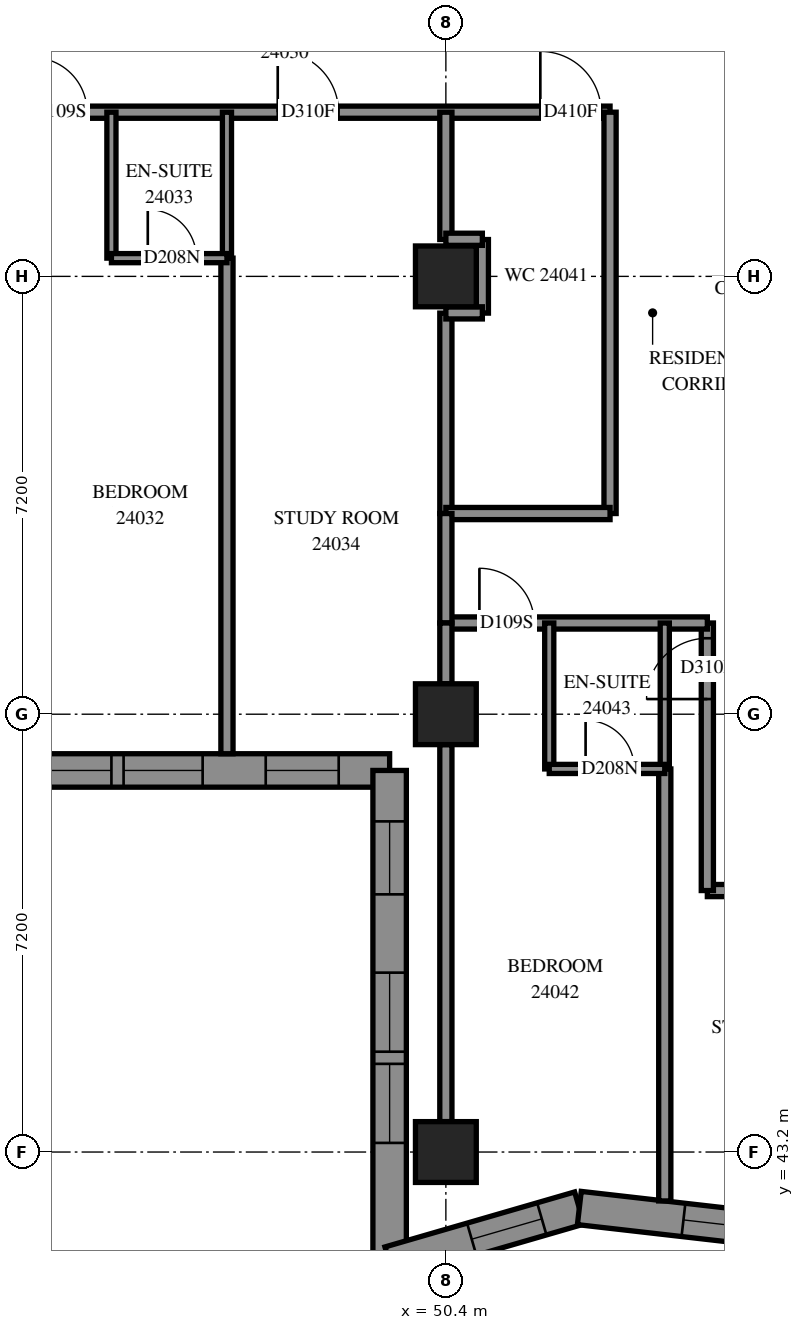
"""IFC4 building model, lengths in metres.
Left out: names, types, materials, properties, quantities, classifications, styles, units other than length and angle.
Written with IfcOpenShell. Run it as: python <this file> out.ifc"""

import sys

from ifc_helpers import new_model, si_unit, direction, frame, frame_2d, origin, origin_2d, place, context, subcontext, project, spatial, polyline, rectangle, outline, extrude, element, fill, save


model = new_model("IFC4")
c1 = context("Model", 3, precision=1e-05, world=origin(), true_north=direction((0.0, 1.0)))
c2 = subcontext(c1, "Body", "Model", "MODEL_VIEW")
j1 = project(units=[si_unit("LENGTHUNIT", "METRE"), si_unit("PLANEANGLEUNIT", "RADIAN")], contexts=[c1])
p1 = place(None, origin())
s1 = spatial("IfcSite", under=j1, at=p1, CompositionType="ELEMENT")
p2 = place(p1, origin())
s2 = spatial("IfcBuilding", under=s1, at=p2, CompositionType="ELEMENT")
p3 = place(p2, frame((0.0, 0.0, 91.4)))
s3 = spatial("IfcBuildingStorey", under=s2, at=p3, CompositionType="ELEMENT", Elevation=91.4)
for number, where, z_axis, x_axis in (
    (1, (50.4, 43.2, 0.0), (0.0, 0.0, 1.0), (1.0, 0.0, 0.0)),
    (2, (50.4, 50.4, 0.0), (0.0, 0.0, 1.0), (1.0, 0.0, 0.0)),
    (3, (50.4, 57.6, 0.0), (0.0, 0.0, 1.0), (1.0, 0.0, 0.0)),
):
    element("IfcColumn", number, at=place(p3, frame(where, z_axis=z_axis, x_axis=x_axis)), inside=s3, PredefinedType="COLUMN", context=c2, shape_type="SweptSolid", body=[
        extrude(rectangle(XDim=1.0, YDim=1.0, at=origin_2d()), origin(), (0.0, 0.0, 1.0), 3.1),
    ])
p4 = place(p3, frame((42.275, 49.475, 0.0), z_axis=(0.0, 0.0, 1.0), x_axis=(1.0, 0.0, 0.0)))
e4 = element("IfcWall", 4, at=p4, inside=s3, PredefinedType="SOLIDWALL", context=c2, shape_type="SweptSolid", body=[
    extrude(outline(polyline([(-0.275, -0.275), (6.925, -0.275), (7.475, 0.275), (0.275, 0.275), (-0.275, -0.275)])), origin(), (0.0, 0.0, 1.0), 3.1),
])
p5 = place(p4, frame((1.325, 0.0, 0.5)))
e5 = element("IfcOpeningElement", 5, at=p5, cuts=e4, PredefinedType="OPENING", context=c2, shape_type="SweptSolid", body=[
    extrude(rectangle(XDim=1.3, YDim=2.45, at=frame_2d((0.65, 1.225))), frame((0.0, 0.285, 0.0), z_axis=(0.0, -1.0, 0.0), x_axis=(1.0, 0.0, 0.0)), (0.0, 0.0, 1.0), 0.57),
])
p6 = place(p4, frame((2.825, 0.0, 0.5)))
e6 = element("IfcOpeningElement", 6, at=p6, cuts=e4, PredefinedType="OPENING", context=c2, shape_type="SweptSolid", body=[
    extrude(rectangle(XDim=1.3, YDim=2.45, at=frame_2d((0.65, 1.225))), frame((0.0, 0.285, 0.0), z_axis=(0.0, -1.0, 0.0), x_axis=(1.0, 0.0, 0.0)), (0.0, 0.0, 1.0), 0.57),
])
p7 = place(p4, frame((5.162, 0.0, 0.5)))
e7 = element("IfcOpeningElement", 7, at=p7, cuts=e4, PredefinedType="OPENING", context=c2, shape_type="SweptSolid", body=[
    extrude(rectangle(XDim=1.2, YDim=2.45, at=frame_2d((0.6, 1.225))), frame((0.0, 0.285, 0.0), z_axis=(0.0, -1.0, 0.0), x_axis=(1.0, 0.0, 0.0)), (0.0, 0.0, 1.0), 0.57),
])
p8 = place(p3, frame((49.475, 49.475, 0.0), z_axis=(0.0, 0.0, 1.0), x_axis=(0.0, -1.0, 0.0)))
e8 = element("IfcWall", 8, at=p8, inside=s3, PredefinedType="SOLIDWALL", context=c2, shape_type="SweptSolid", body=[
    extrude(outline(polyline([(0.275, -0.275), (8.466, -0.275), (7.734, 0.275), (-0.275, 0.275), (0.275, -0.275)])), origin(), (0.0, 0.0, 1.0), 3.1),
])
p9 = place(p8, frame((3.325, 0.0, 0.5)))
e9 = element("IfcOpeningElement", 9, at=p9, cuts=e8, PredefinedType="OPENING", context=c2, shape_type="SweptSolid", body=[
    extrude(rectangle(XDim=1.3, YDim=2.45, at=frame_2d((0.65, 1.225))), frame((0.0, 0.285, 0.0), z_axis=(0.0, -1.0, 0.0), x_axis=(1.0, 0.0, 0.0)), (0.0, 0.0, 1.0), 0.57),
])
p10 = place(p8, frame((4.825, 0.0, 0.5)))
e10 = element("IfcOpeningElement", 10, at=p10, cuts=e8, PredefinedType="OPENING", context=c2, shape_type="SweptSolid", body=[
    extrude(rectangle(XDim=1.3, YDim=2.45, at=frame_2d((0.65, 1.225))), frame((0.0, 0.285, 0.0), z_axis=(0.0, -1.0, 0.0), x_axis=(1.0, 0.0, 0.0)), (0.0, 0.0, 1.0), 0.57),
])
p11 = place(p8, frame((0.838, 0.0, 0.5)))
e11 = element("IfcOpeningElement", 11, at=p11, cuts=e8, PredefinedType="OPENING", context=c2, shape_type="SweptSolid", body=[
    extrude(rectangle(XDim=1.2, YDim=2.45, at=frame_2d((0.6, 1.225))), frame((0.0, 0.285, 0.0), z_axis=(0.0, -1.0, 0.0), x_axis=(1.0, 0.0, 0.0)), (0.0, 0.0, 1.0), 0.57),
])
p12 = place(p3, frame((49.475, 41.375, 0.0), z_axis=(0.0, 0.0, 1.0), x_axis=(0.9604525251, 0.2784437952, 0.0)))
e12 = element("IfcWall", 12, at=p12, inside=s3, PredefinedType="SOLIDWALL", context=c2, shape_type="SweptSolid", body=[
    extrude(outline(polyline([(-0.366, -0.275), (3.193, -0.275), (3.303, 0.275), (0.366, 0.275), (-0.366, -0.275)])), origin(), (0.0, 0.0, 1.0), 3.1),
])
p13 = place(p12, frame((1.406, 0.0, 0.5)))
e13 = element("IfcOpeningElement", 13, at=p13, cuts=e12, PredefinedType="OPENING", context=c2, shape_type="SweptSolid", body=[
    extrude(rectangle(XDim=1.2, YDim=2.45, at=frame_2d((0.6, 1.225))), frame((0.0, 0.285, 0.0), z_axis=(0.0, -1.0, 0.0), x_axis=(1.0, 0.0, 0.0)), (0.0, 0.0, 1.0), 0.57),
])
p14 = place(p3, frame((52.595, 42.279, 0.0), z_axis=(0.0, 0.0, 1.0), x_axis=(0.9935212234, -0.1136467272, 0.0)))
e14 = element("IfcWall", 14, at=p14, inside=s3, PredefinedType="SOLIDWALL", context=c2, shape_type="SweptSolid", body=[
    extrude(outline(polyline([(0.055, -0.275), (3.496, -0.275), (3.433, 0.275), (-0.055, 0.275), (0.055, -0.275)])), origin(), (0.0, 0.0, 1.0), 3.1),
])
p15 = place(p14, frame((1.724, 0.0, 0.5)))
e15 = element("IfcOpeningElement", 15, at=p15, cuts=e14, PredefinedType="OPENING", context=c2, shape_type="SweptSolid", body=[
    extrude(rectangle(XDim=1.2, YDim=2.45, at=frame_2d((0.6, 1.225))), frame((0.0, 0.285, 0.0), z_axis=(0.0, -1.0, 0.0), x_axis=(1.0, 0.0, 0.0)), (0.0, 0.0, 1.0), 0.57),
])
p16 = place(p3, frame((28.802, 60.3, 0.0), z_axis=(0.0, 0.0, 1.0), x_axis=(1.0, 0.0, 0.0)))
e16 = element("IfcWall", 16, at=p16, inside=s3, PredefinedType="PARTITIONING", context=c2, shape_type="SweptSolid", body=[
    extrude(rectangle(XDim=24.298, YDim=0.2, at=frame_2d((12.149, 0.0))), origin(), (0.0, 0.0, 1.0), 3.1),
])
p17 = place(p16, frame((5.972, 0.0, 0.0)))
e17 = element("IfcOpeningElement", 17, at=p17, cuts=e16, PredefinedType="OPENING", context=c2, shape_type="SweptSolid", body=[
    extrude(rectangle(XDim=1.0, YDim=2.1, at=frame_2d((0.5, 1.05))), frame((0.0, 0.11, 0.0), z_axis=(0.0, -1.0, 0.0), x_axis=(1.0, 0.0, 0.0)), (0.0, 0.0, 1.0), 0.22),
])
p18 = place(p16, frame((11.323, 0.0, 0.0)))
e18 = element("IfcOpeningElement", 18, at=p18, cuts=e16, PredefinedType="OPENING", context=c2, shape_type="SweptSolid", body=[
    extrude(rectangle(XDim=1.0, YDim=2.1, at=frame_2d((0.5, 1.05))), frame((0.0, 0.11, 0.0), z_axis=(0.0, -1.0, 0.0), x_axis=(1.0, 0.0, 0.0)), (0.0, 0.0, 1.0), 0.22),
])
p19 = place(p16, frame((14.798, 0.0, 0.0)))
e19 = element("IfcOpeningElement", 19, at=p19, cuts=e16, PredefinedType="OPENING", context=c2, shape_type="SweptSolid", body=[
    extrude(rectangle(XDim=0.9, YDim=2.1, at=frame_2d((0.45, 1.05))), frame((0.0, 0.11, 0.0), z_axis=(0.0, -1.0, 0.0), x_axis=(1.0, 0.0, 0.0)), (0.0, 0.0, 1.0), 0.22),
])
p20 = place(p16, frame((18.833, 0.0, 0.0)))
e20 = element("IfcOpeningElement", 20, at=p20, cuts=e16, PredefinedType="OPENING", context=c2, shape_type="SweptSolid", body=[
    extrude(rectangle(XDim=1.0, YDim=2.1, at=frame_2d((0.5, 1.05))), frame((0.0, 0.11, 0.0), z_axis=(0.0, -1.0, 0.0), x_axis=(1.0, 0.0, 0.0)), (0.0, 0.0, 1.0), 0.22),
])
p21 = place(p16, frame((23.151, 0.0, 0.0)))
e21 = element("IfcOpeningElement", 21, at=p21, cuts=e16, PredefinedType="OPENING", context=c2, shape_type="SweptSolid", body=[
    extrude(rectangle(XDim=1.0, YDim=2.1, at=frame_2d((0.5, 1.05))), frame((0.0, 0.11, 0.0), z_axis=(0.0, -1.0, 0.0), x_axis=(1.0, 0.0, 0.0)), (0.0, 0.0, 1.0), 0.22),
])
p22 = place(p3, frame((54.7, 47.5, 0.0), z_axis=(0.0, 0.0, 1.0), x_axis=(1.0, 0.0, 0.0)))
e22 = element("IfcWall", 22, at=p22, inside=s3, PredefinedType="PARTITIONING", context=c2, shape_type="SweptSolid", body=[
    extrude(rectangle(XDim=19.442, YDim=0.2, at=frame_2d((9.721, 0.0))), origin(), (0.0, 0.0, 1.0), 3.1),
])
p23 = place(p22, frame((5.2, 0.0, 0.0)))
e23 = element("IfcOpeningElement", 23, at=p23, cuts=e22, PredefinedType="OPENING", context=c2, shape_type="SweptSolid", body=[
    extrude(rectangle(XDim=0.9, YDim=2.1, at=frame_2d((0.45, 1.05))), frame((0.0, 0.11, 0.0), z_axis=(0.0, -1.0, 0.0), x_axis=(1.0, 0.0, 0.0)), (0.0, 0.0, 1.0), 0.22),
])
p24 = place(p22, frame((6.9, 0.0, 0.0)))
e24 = element("IfcOpeningElement", 24, at=p24, cuts=e22, PredefinedType="OPENING", context=c2, shape_type="SweptSolid", body=[
    extrude(rectangle(XDim=0.9, YDim=2.1, at=frame_2d((0.45, 1.05))), frame((0.0, 0.11, 0.0), z_axis=(0.0, -1.0, 0.0), x_axis=(1.0, 0.0, 0.0)), (0.0, 0.0, 1.0), 0.22),
])
p25 = place(p22, frame((13.963, 0.0, 0.0)))
e25 = element("IfcOpeningElement", 25, at=p25, cuts=e22, PredefinedType="OPENING", context=c2, shape_type="SweptSolid", body=[
    extrude(rectangle(XDim=1.0, YDim=2.1, at=frame_2d((0.5, 1.05))), frame((0.0, 0.11, 0.0), z_axis=(0.0, -1.0, 0.0), x_axis=(1.0, 0.0, 0.0)), (0.0, 0.0, 1.0), 0.22),
])
p26 = place(p3, frame((46.8, 49.75, 0.0), z_axis=(0.0, 0.0, 1.0), x_axis=(0.0, 1.0, 0.0)))
e26 = element("IfcWall", 26, at=p26, inside=s3, PredefinedType="PARTITIONING", context=c2, shape_type="SweptSolid", body=[
    extrude(rectangle(XDim=8.15, YDim=0.2, at=frame_2d((4.075, 0.0))), origin(), (0.0, 0.0, 1.0), 3.1),
])
p27 = place(p3, frame((54.0, 42.395, 0.0), z_axis=(0.0, 0.0, 1.0), x_axis=(0.0, 1.0, 0.0)))
e27 = element("IfcWall", 27, at=p27, inside=s3, PredefinedType="PARTITIONING", context=c2, shape_type="SweptSolid", body=[
    extrude(rectangle(XDim=7.104, YDim=0.2, at=frame_2d((3.552, 0.0))), origin(), (0.0, 0.0, 1.0), 3.1),
])
p28 = place(p3, frame((53.1, 53.7, 0.0), z_axis=(0.0, 0.0, 1.0), x_axis=(0.0, 1.0, 0.0)))
e28 = element("IfcWall", 28, at=p28, inside=s3, PredefinedType="PARTITIONING", context=c2, shape_type="SweptSolid", body=[
    extrude(rectangle(XDim=6.6, YDim=0.2, at=frame_2d((3.3, 0.0))), origin(), (0.0, 0.0, 1.0), 3.1),
])
p29 = place(p3, frame((50.4, 43.7, 0.0), z_axis=(0.0, 0.0, 1.0), x_axis=(0.0, 1.0, 0.0)))
e29 = element("IfcWall", 29, at=p29, inside=s3, PredefinedType="PARTITIONING", context=c2, shape_type="SweptSolid", body=[
    extrude(rectangle(XDim=6.2, YDim=0.2, at=frame_2d((3.1, 0.0))), origin(), (0.0, 0.0, 1.0), 2.6),
])
p30 = place(p3, frame((54.7, 47.5, 0.0), z_axis=(0.0, 0.0, 1.0), x_axis=(0.0, 1.0, 0.0)))
e30 = element("IfcWall", 30, at=p30, inside=s3, PredefinedType="PARTITIONING", context=c2, shape_type="SweptSolid", body=[
    extrude(rectangle(XDim=4.4, YDim=0.2, at=frame_2d((2.2, 0.0))), origin(), (0.0, 0.0, 1.0), 3.1),
])
p31 = place(p30, frame((3.149, 0.0, 0.0)))
e31 = element("IfcOpeningElement", 31, at=p31, cuts=e30, PredefinedType="OPENING", context=c2, shape_type="SweptSolid", body=[
    extrude(rectangle(XDim=1.0, YDim=2.1, at=frame_2d((0.5, 1.05))), frame((0.0, 0.11, 0.0), z_axis=(0.0, -1.0, 0.0), x_axis=(1.0, 0.0, 0.0)), (0.0, 0.0, 1.0), 0.22),
])
p32 = place(p3, frame((50.4, 51.9, 0.0), z_axis=(0.0, 0.0, 1.0), x_axis=(1.0, 0.0, 0.0)))
e32 = element("IfcWall", 32, at=p32, inside=s3, PredefinedType="PARTITIONING", context=c2, shape_type="SweptSolid", body=[
    extrude(rectangle(XDim=4.3, YDim=0.2, at=frame_2d((2.15, 0.0))), origin(), (0.0, 0.0, 1.0), 3.1),
])
p33 = place(p32, frame((0.552, 0.0, 0.0)))
e33 = element("IfcOpeningElement", 33, at=p33, cuts=e32, PredefinedType="OPENING", context=c2, shape_type="SweptSolid", body=[
    extrude(rectangle(XDim=0.9, YDim=2.1, at=frame_2d((0.45, 1.05))), frame((0.0, 0.11, 0.0), z_axis=(0.0, -1.0, 0.0), x_axis=(1.0, 0.0, 0.0)), (0.0, 0.0, 1.0), 0.22),
])
p34 = place(p3, frame((50.4, 53.7, 0.0), z_axis=(0.0, 0.0, 1.0), x_axis=(0.0, 1.0, 0.0)))
e34 = element("IfcWall", 34, at=p34, inside=s3, PredefinedType="PARTITIONING", context=c2, shape_type="SweptSolid", body=[
    extrude(rectangle(XDim=3.296, YDim=0.2, at=frame_2d((1.648, 0.0))), origin(), (0.0, 0.0, 1.0), 3.1),
])
p35 = place(p3, frame((50.4, 53.7, 0.0), z_axis=(0.0, 0.0, 1.0), x_axis=(1.0, 0.0, 0.0)))
e35 = element("IfcWall", 35, at=p35, inside=s3, PredefinedType="PARTITIONING", context=c2, shape_type="SweptSolid", body=[
    extrude(rectangle(XDim=2.7, YDim=0.2, at=frame_2d((1.35, 0.0))), origin(), (0.0, 0.0, 1.0), 3.1),
])
for number, where, z_axis, x_axis in (
    (36, (44.9, 57.9, 0.0), (0.0, 0.0, 1.0), (0.0, 1.0, 0.0)),
    (37, (46.8, 57.9, 0.0), (0.0, 0.0, 1.0), (0.0, 1.0, 0.0)),
    (38, (52.1, 49.5, 0.0), (0.0, 0.0, 1.0), (0.0, 1.0, 0.0)),
    (39, (54.0, 49.5, 0.0), (0.0, 0.0, 1.0), (0.0, 1.0, 0.0)),
):
    element("IfcWall", number, at=place(p3, frame(where, z_axis=z_axis, x_axis=x_axis)), inside=s3, PredefinedType="PARTITIONING", context=c2, shape_type="SweptSolid", body=[
        extrude(rectangle(XDim=2.4, YDim=0.15, at=frame_2d((1.2, 0.0))), origin(), (0.0, 0.0, 1.0), 3.1),
    ])
p36 = place(p3, frame((50.4, 58.206, 0.0), z_axis=(0.0, 0.0, 1.0), x_axis=(0.0, 1.0, 0.0)))
e40 = element("IfcWall", 40, at=p36, inside=s3, PredefinedType="PARTITIONING", context=c2, shape_type="SweptSolid", body=[
    extrude(rectangle(XDim=2.094, YDim=0.2, at=frame_2d((1.047, 0.0))), origin(), (0.0, 0.0, 1.0), 3.1),
])
p37 = place(p3, frame((44.9, 57.9, 0.0), z_axis=(0.0, 0.0, 1.0), x_axis=(1.0, 0.0, 0.0)))
e41 = element("IfcWall", 41, at=p37, inside=s3, PredefinedType="PARTITIONING", context=c2, shape_type="SweptSolid", body=[
    extrude(rectangle(XDim=1.9, YDim=0.15, at=frame_2d((0.95, 0.0))), origin(), (0.0, 0.0, 1.0), 3.1),
])
p38 = place(p37, frame((0.598, 0.0, 0.0)))
e42 = element("IfcOpeningElement", 42, at=p38, cuts=e41, PredefinedType="OPENING", context=c2, shape_type="SweptSolid", body=[
    extrude(rectangle(XDim=0.8, YDim=2.1, at=frame_2d((0.4, 1.05))), frame((0.0, 0.085, 0.0), z_axis=(0.0, -1.0, 0.0), x_axis=(1.0, 0.0, 0.0)), (0.0, 0.0, 1.0), 0.17),
])
p39 = place(p3, frame((52.1, 49.5, 0.0), z_axis=(0.0, 0.0, 1.0), x_axis=(1.0, 0.0, 0.0)))
e43 = element("IfcWall", 43, at=p39, inside=s3, PredefinedType="PARTITIONING", context=c2, shape_type="SweptSolid", body=[
    extrude(rectangle(XDim=1.9, YDim=0.15, at=frame_2d((0.95, 0.0))), origin(), (0.0, 0.0, 1.0), 3.1),
])
p40 = place(p39, frame((0.598, 0.0, 0.0)))
e44 = element("IfcOpeningElement", 44, at=p40, cuts=e43, PredefinedType="OPENING", context=c2, shape_type="SweptSolid", body=[
    extrude(rectangle(XDim=0.8, YDim=2.1, at=frame_2d((0.4, 1.05))), frame((0.0, 0.085, 0.0), z_axis=(0.0, -1.0, 0.0), x_axis=(1.0, 0.0, 0.0)), (0.0, 0.0, 1.0), 0.17),
])
p41 = place(p3, frame((50.4, 51.9, 0.0), z_axis=(0.0, 0.0, 1.0), x_axis=(0.0, 1.0, 0.0)))
e45 = element("IfcWall", 45, at=p41, inside=s3, PredefinedType="PARTITIONING", context=c2, shape_type="SweptSolid", body=[
    extrude(rectangle(XDim=1.8, YDim=0.2, at=frame_2d((0.9, 0.0))), origin(), (0.0, 0.0, 1.0), 3.1),
])
p42 = place(p3, frame((51.0, 56.996, 0.0), z_axis=(0.0, 0.0, 1.0), x_axis=(0.0, 1.0, 0.0)))
e46 = element("IfcWall", 46, at=p42, inside=s3, PredefinedType="PARTITIONING", context=c2, shape_type="SweptSolid", body=[
    extrude(rectangle(XDim=1.21, YDim=0.2, at=frame_2d((0.605, 0.0))), origin(), (0.0, 0.0, 1.0), 3.1),
])
p43 = place(p3, frame((50.4, 50.9, 0.0), z_axis=(0.0, 0.0, 1.0), x_axis=(0.0, 1.0, 0.0)))
e47 = element("IfcWall", 47, at=p43, inside=s3, PredefinedType="PARTITIONING", context=c2, shape_type="SweptSolid", body=[
    extrude(rectangle(XDim=1.0, YDim=0.2, at=frame_2d((0.5, 0.0))), origin(), (0.0, 0.0, 1.0), 3.1),
])
for number, where, z_axis, x_axis in (
    (48, (50.4, 58.21, 0.0), (0.0, 0.0, 1.0), (1.0, 0.0, 0.0)),
    (49, (50.4, 57.0, 0.0), (0.0, 0.0, 1.0), (1.0, 0.0, 0.0)),
):
    element("IfcWall", number, at=place(p3, frame(where, z_axis=z_axis, x_axis=x_axis)), inside=s3, PredefinedType="PARTITIONING", context=c2, shape_type="SweptSolid", body=[
        extrude(rectangle(XDim=0.6, YDim=0.2, at=frame_2d((0.3, 0.0))), origin(), (0.0, 0.0, 1.0), 3.1),
    ])
p44 = place(p5, origin())
e50 = element("IfcWindow", 50, at=p44, inside=s3, PartitioningType="SINGLE_PANEL", PredefinedType="WINDOW", context=c2, shape_type="SweptSolid", body=[
    extrude(rectangle(XDim=1.3, YDim=2.45, at=frame_2d((0.65, 1.225))), frame((0.0, 0.155, 0.0), z_axis=(0.0, -1.0, 0.0), x_axis=(1.0, 0.0, 0.0)), (0.0, 0.0, 1.0), 0.06),
])
fill(e5, e50)
p45 = place(p6, origin())
e51 = element("IfcWindow", 51, at=p45, inside=s3, PartitioningType="SINGLE_PANEL", PredefinedType="WINDOW", context=c2, shape_type="SweptSolid", body=[
    extrude(rectangle(XDim=1.3, YDim=2.45, at=frame_2d((0.65, 1.225))), frame((0.0, 0.155, 0.0), z_axis=(0.0, -1.0, 0.0), x_axis=(1.0, 0.0, 0.0)), (0.0, 0.0, 1.0), 0.06),
])
fill(e6, e51)
p46 = place(p7, origin())
e52 = element("IfcWindow", 52, at=p46, inside=s3, PartitioningType="SINGLE_PANEL", PredefinedType="WINDOW", context=c2, shape_type="SweptSolid", body=[
    extrude(rectangle(XDim=1.2, YDim=2.45, at=frame_2d((0.6, 1.225))), frame((0.0, 0.155, 0.0), z_axis=(0.0, -1.0, 0.0), x_axis=(1.0, 0.0, 0.0)), (0.0, 0.0, 1.0), 0.06),
])
fill(e7, e52)
p47 = place(p9, origin())
e53 = element("IfcWindow", 53, at=p47, inside=s3, PartitioningType="SINGLE_PANEL", PredefinedType="WINDOW", context=c2, shape_type="SweptSolid", body=[
    extrude(rectangle(XDim=1.3, YDim=2.45, at=frame_2d((0.65, 1.225))), frame((0.0, 0.155, 0.0), z_axis=(0.0, -1.0, 0.0), x_axis=(1.0, 0.0, 0.0)), (0.0, 0.0, 1.0), 0.06),
])
fill(e9, e53)
p48 = place(p10, origin())
e54 = element("IfcWindow", 54, at=p48, inside=s3, PartitioningType="SINGLE_PANEL", PredefinedType="WINDOW", context=c2, shape_type="SweptSolid", body=[
    extrude(rectangle(XDim=1.3, YDim=2.45, at=frame_2d((0.65, 1.225))), frame((0.0, 0.155, 0.0), z_axis=(0.0, -1.0, 0.0), x_axis=(1.0, 0.0, 0.0)), (0.0, 0.0, 1.0), 0.06),
])
fill(e10, e54)
p49 = place(p11, origin())
e55 = element("IfcWindow", 55, at=p49, inside=s3, PartitioningType="SINGLE_PANEL", PredefinedType="WINDOW", context=c2, shape_type="SweptSolid", body=[
    extrude(rectangle(XDim=1.2, YDim=2.45, at=frame_2d((0.6, 1.225))), frame((0.0, 0.155, 0.0), z_axis=(0.0, -1.0, 0.0), x_axis=(1.0, 0.0, 0.0)), (0.0, 0.0, 1.0), 0.06),
])
fill(e11, e55)
p50 = place(p13, origin())
e56 = element("IfcWindow", 56, at=p50, inside=s3, PartitioningType="SINGLE_PANEL", PredefinedType="WINDOW", context=c2, shape_type="SweptSolid", body=[
    extrude(rectangle(XDim=1.2, YDim=2.45, at=frame_2d((0.6, 1.225))), frame((0.0, 0.155, 0.0), z_axis=(0.0, -1.0, 0.0), x_axis=(1.0, 0.0, 0.0)), (0.0, 0.0, 1.0), 0.06),
])
fill(e13, e56)
p51 = place(p15, origin())
e57 = element("IfcWindow", 57, at=p51, inside=s3, PartitioningType="SINGLE_PANEL", PredefinedType="WINDOW", context=c2, shape_type="SweptSolid", body=[
    extrude(rectangle(XDim=1.2, YDim=2.45, at=frame_2d((0.6, 1.225))), frame((0.0, 0.155, 0.0), z_axis=(0.0, -1.0, 0.0), x_axis=(1.0, 0.0, 0.0)), (0.0, 0.0, 1.0), 0.06),
])
fill(e15, e57)
p52 = place(p19, origin())
e58 = element("IfcDoor", 58, at=p52, inside=s3, OperationType="SINGLE_SWING_LEFT", PredefinedType="DOOR", context=c2, shape_type="SweptSolid", body=[
    extrude(rectangle(XDim=0.9, YDim=2.1, at=frame_2d((0.45, 1.05))), frame((0.0, 0.025, 0.0), z_axis=(0.0, -1.0, 0.0), x_axis=(1.0, 0.0, 0.0)), (0.0, 0.0, 1.0), 0.05),
])
fill(e19, e58)
p53 = place(p38, origin())
e59 = element("IfcDoor", 59, at=p53, inside=s3, OperationType="SINGLE_SWING_RIGHT", PredefinedType="DOOR", context=c2, shape_type="SweptSolid", body=[
    extrude(rectangle(XDim=0.8, YDim=2.1, at=frame_2d((0.4, 1.05))), frame((0.0, 0.025, 0.0), z_axis=(0.0, -1.0, 0.0), x_axis=(1.0, 0.0, 0.0)), (0.0, 0.0, 1.0), 0.05),
])
fill(e42, e59)
p54 = place(p20, origin())
e60 = element("IfcDoor", 60, at=p54, inside=s3, OperationType="SINGLE_SWING_RIGHT", PredefinedType="DOOR", context=c2, shape_type="SweptSolid", body=[
    extrude(rectangle(XDim=1.0, YDim=2.1, at=frame_2d((0.5, 1.05))), frame((0.0, 0.025, 0.0), z_axis=(0.0, -1.0, 0.0), x_axis=(1.0, 0.0, 0.0)), (0.0, 0.0, 1.0), 0.05),
])
fill(e20, e60)
p55 = place(p21, origin())
e61 = element("IfcDoor", 61, at=p55, inside=s3, OperationType="SINGLE_SWING_LEFT", PredefinedType="DOOR", context=c2, shape_type="SweptSolid", body=[
    extrude(rectangle(XDim=1.0, YDim=2.1, at=frame_2d((0.5, 1.05))), frame((0.0, 0.025, 0.0), z_axis=(0.0, -1.0, 0.0), x_axis=(1.0, 0.0, 0.0)), (0.0, 0.0, 1.0), 0.05),
])
fill(e21, e61)
p56 = place(p33, origin())
e62 = element("IfcDoor", 62, at=p56, inside=s3, OperationType="SINGLE_SWING_LEFT", PredefinedType="DOOR", context=c2, shape_type="SweptSolid", body=[
    extrude(rectangle(XDim=0.9, YDim=2.1, at=frame_2d((0.45, 1.05))), frame((0.0, 0.025, 0.0), z_axis=(0.0, -1.0, 0.0), x_axis=(1.0, 0.0, 0.0)), (0.0, 0.0, 1.0), 0.05),
])
fill(e33, e62)
p57 = place(p40, origin())
e63 = element("IfcDoor", 63, at=p57, inside=s3, OperationType="SINGLE_SWING_RIGHT", PredefinedType="DOOR", context=c2, shape_type="SweptSolid", body=[
    extrude(rectangle(XDim=0.8, YDim=2.1, at=frame_2d((0.4, 1.05))), frame((0.0, 0.025, 0.0), z_axis=(0.0, -1.0, 0.0), x_axis=(1.0, 0.0, 0.0)), (0.0, 0.0, 1.0), 0.05),
])
fill(e44, e63)
p58 = place(p31, origin())
e64 = element("IfcDoor", 64, at=p58, inside=s3, OperationType="SINGLE_SWING_RIGHT", PredefinedType="DOOR", context=c2, shape_type="SweptSolid", body=[
    extrude(rectangle(XDim=1.0, YDim=2.1, at=frame_2d((0.5, 1.05))), frame((0.0, 0.025, 0.0), z_axis=(0.0, -1.0, 0.0), x_axis=(1.0, 0.0, 0.0)), (0.0, 0.0, 1.0), 0.05),
])
fill(e31, e64)
save(model, sys.argv[1])
